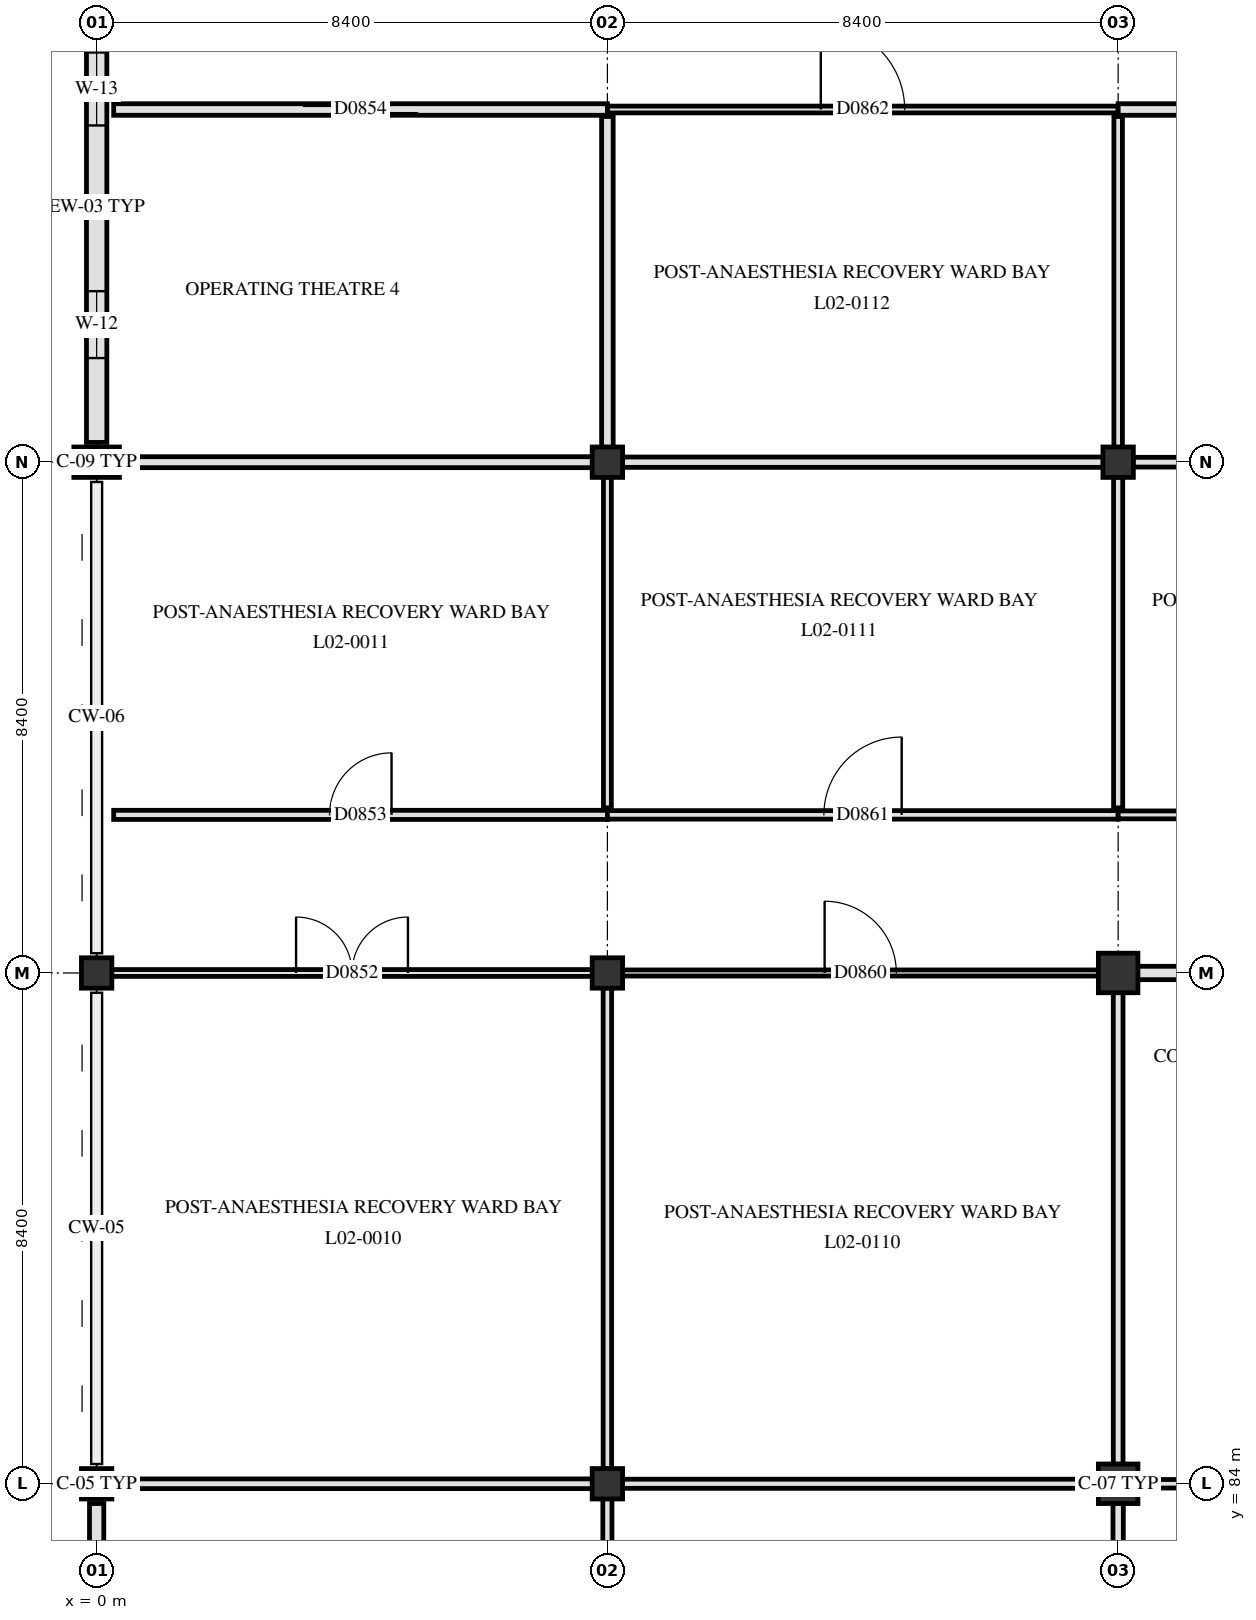
"""IFC4 building model, lengths in metres.
Left out: names, types, materials, properties, quantities, classifications, styles, units other than length and angle.
Written with IfcOpenShell. Run it as: python <this file> out.ifc"""

import sys

from ifc_helpers import new_model, si_unit, direction, frame, frame_2d, origin, origin_2d, place, context, subcontext, project, spatial, rectangle, circle, extrude, element, fill, save


model = new_model("IFC4")
c1 = context("Model", 3, precision=1e-05, world=origin(), true_north=direction((0.0, 1.0)))
c2 = subcontext(c1, "Body", "Model", "MODEL_VIEW")
j1 = project(units=[si_unit("LENGTHUNIT", "METRE"), si_unit("PLANEANGLEUNIT", "RADIAN")], contexts=[c1])
p1 = place(None, origin())
s1 = spatial("IfcSite", under=j1, at=p1, CompositionType="ELEMENT")
p2 = place(p1, origin())
s2 = spatial("IfcBuilding", under=s1, at=p2, CompositionType="ELEMENT")
p3 = place(p2, frame((0.0, 0.0, 9.3)))
s3 = spatial("IfcBuildingStorey", under=s2, at=p3, CompositionType="ELEMENT", Elevation=9.3)
for number, where, z_axis, x_axis in (
    (1, (0.0, 84.0, 0.0), (0.0, 0.0, 1.0), (1.0, 0.0, 0.0)),
    (2, (0.0, 92.4, 0.0), (0.0, 0.0, 1.0), (1.0, 0.0, 0.0)),
):
    element("IfcColumn", number, at=place(p3, frame(where, z_axis=z_axis, x_axis=x_axis)), inside=s3, PredefinedType="COLUMN", context=c2, shape_type="SweptSolid", body=[
        extrude(rectangle(XDim=0.5, YDim=0.5, at=origin_2d()), origin(), (0.0, 0.0, 1.0), 5.1),
    ])
p4 = place(p3, frame((0.0, 100.8, 0.0), z_axis=(0.0, 0.0, 1.0), x_axis=(0.0, 1.0, 0.0)))
e3 = element("IfcColumn", 3, at=p4, inside=s3, PredefinedType="PILASTER", context=c2, shape_type="SweptSolid", body=[
    extrude(rectangle(XDim=0.5, YDim=0.75, at=origin_2d()), origin(), (0.0, 0.0, 1.0), 5.1),
])
for number, where, z_axis, x_axis in (
    (4, (8.4, 84.0, 0.0), (0.0, 0.0, 1.0), (1.0, 0.0, 0.0)),
    (5, (8.4, 92.4, 0.0), (0.0, 0.0, 1.0), (1.0, 0.0, 0.0)),
    (6, (8.4, 100.8, 0.0), (0.0, 0.0, 1.0), (1.0, 0.0, 0.0)),
):
    element("IfcColumn", number, at=place(p3, frame(where, z_axis=z_axis, x_axis=x_axis)), inside=s3, PredefinedType="COLUMN", context=c2, shape_type="SweptSolid", body=[
        extrude(rectangle(XDim=0.5, YDim=0.5, at=origin_2d()), origin(), (0.0, 0.0, 1.0), 5.1),
    ])
for number, where, z_axis, x_axis in (
    (7, (16.8, 84.0, 0.0), (0.0, 0.0, 1.0), (1.0, 0.0, 0.0)),
    (8, (16.8, 92.4, 0.0), (0.0, 0.0, 1.0), (1.0, 0.0, 0.0)),
):
    element("IfcColumn", number, at=place(p3, frame(where, z_axis=z_axis, x_axis=x_axis)), inside=s3, PredefinedType="COLUMN", context=c2, shape_type="SweptSolid", body=[
        extrude(circle(Radius=0.325, at=origin_2d()), origin(), (0.0, 0.0, 1.0), 5.1),
    ])
p5 = place(p3, frame((16.8, 100.8, 0.0), z_axis=(0.0, 0.0, 1.0), x_axis=(1.0, 0.0, 0.0)))
e9 = element("IfcColumn", 9, at=p5, inside=s3, PredefinedType="COLUMN", context=c2, shape_type="SweptSolid", body=[
    extrude(rectangle(XDim=0.5, YDim=0.5, at=origin_2d()), origin(), (0.0, 0.0, 1.0), 5.1),
])
p6 = place(p3, frame((0.0, 75.925, 0.0), z_axis=(0.0, 0.0, 1.0), x_axis=(0.0, 1.0, 0.0)))
e10 = element("IfcWall", 10, at=p6, inside=s3, PredefinedType="SOLIDWALL", context=c2, shape_type="SweptSolid", body=[
    extrude(rectangle(XDim=7.75, YDim=0.235, at=frame_2d((3.875, 0.0))), origin(), (0.0, 0.0, 1.0), 4.07),
])
p7 = place(p6, frame((1.012, 0.0, 0.85)))
e11 = element("IfcOpeningElement", 11, at=p7, cuts=e10, PredefinedType="OPENING", context=c2, shape_type="SweptSolid", body=[
    extrude(rectangle(XDim=1.85, YDim=1.3, at=frame_2d((0.925, 0.65))), frame((0.0, 0.127, 0.0), z_axis=(0.0, -1.0, 0.0), x_axis=(1.0, 0.0, 0.0)), (0.0, 0.0, 1.0), 0.255),
])
p8 = place(p6, frame((5.312, 0.0, 0.85)))
e12 = element("IfcOpeningElement", 12, at=p8, cuts=e10, PredefinedType="OPENING", context=c2, shape_type="SweptSolid", body=[
    extrude(rectangle(XDim=1.0, YDim=1.42, at=frame_2d((0.5, 0.71))), frame((0.0, 0.127, 0.0), z_axis=(0.0, -1.0, 0.0), x_axis=(1.0, 0.0, 0.0)), (0.0, 0.0, 1.0), 0.255),
])
p9 = place(p3, frame((0.0, 101.125, 0.0), z_axis=(0.0, 0.0, 1.0), x_axis=(0.0, 1.0, 0.0)))
e13 = element("IfcWall", 13, at=p9, inside=s3, PredefinedType="SOLIDWALL", context=c2, shape_type="SweptSolid", body=[
    extrude(rectangle(XDim=7.75, YDim=0.335, at=frame_2d((3.875, 0.0))), origin(), (0.0, 0.0, 1.0), 4.07),
])
p10 = place(p9, frame((1.387, 0.0, 0.85)))
e14 = element("IfcOpeningElement", 14, at=p10, cuts=e13, PredefinedType="OPENING", context=c2, shape_type="SweptSolid", body=[
    extrude(rectangle(XDim=1.1, YDim=1.42, at=frame_2d((0.55, 0.71))), frame((0.0, 0.177, 0.0), z_axis=(0.0, -1.0, 0.0), x_axis=(1.0, 0.0, 0.0)), (0.0, 0.0, 1.0), 0.355),
])
p11 = place(p9, frame((5.212, 0.0, 0.85)))
e15 = element("IfcOpeningElement", 15, at=p11, cuts=e13, PredefinedType="OPENING", context=c2, shape_type="SweptSolid", body=[
    extrude(rectangle(XDim=1.2, YDim=1.42, at=frame_2d((0.6, 0.71))), frame((0.0, 0.177, 0.0), z_axis=(0.0, -1.0, 0.0), x_axis=(1.0, 0.0, 0.0)), (0.0, 0.0, 1.0), 0.355),
])
p12 = place(p3, frame((0.245, 84.0, 0.0), z_axis=(0.0, 0.0, 1.0), x_axis=(1.0, 0.0, 0.0)))
e16 = element("IfcWall", 16, at=p12, inside=s3, PredefinedType="PARTITIONING", context=c2, shape_type="SweptSolid", body=[
    extrude(rectangle(XDim=7.91, YDim=0.16, at=frame_2d((3.955, 0.0))), origin(), (0.0, 0.0, 1.0), 4.02),
])
p13 = place(p3, frame((8.645, 84.0, 0.0), z_axis=(0.0, 0.0, 1.0), x_axis=(1.0, 0.0, 0.0)))
e17 = element("IfcWall", 17, at=p13, inside=s3, PredefinedType="PARTITIONING", context=c2, shape_type="SweptSolid", body=[
    extrude(rectangle(XDim=7.835, YDim=0.15, at=frame_2d((3.917, 0.0))), origin(), (0.0, 0.0, 1.0), 4.02),
])
p14 = place(p3, frame((17.12, 84.0, 0.0), z_axis=(0.0, 0.0, 1.0), x_axis=(1.0, 0.0, 0.0)))
e18 = element("IfcWall", 18, at=p14, inside=s3, PredefinedType="PARTITIONING", context=c2, shape_type="SweptSolid", body=[
    extrude(rectangle(XDim=1.38, YDim=0.14, at=frame_2d((0.69, 0.0))), origin(), (0.0, 0.0, 1.0), 4.77),
])
p15 = place(p3, frame((0.245, 92.4, 0.0), z_axis=(0.0, 0.0, 1.0), x_axis=(1.0, 0.0, 0.0)))
e19 = element("IfcWall", 19, at=p15, inside=s3, PredefinedType="PARTITIONING", context=c2, shape_type="SweptSolid", body=[
    extrude(rectangle(XDim=7.91, YDim=0.112, at=frame_2d((3.955, 0.0))), origin(), (0.0, 0.0, 1.0), 4.02),
])
p16 = place(p15, frame((3.035, 0.0, 0.0)))
e20 = element("IfcOpeningElement", 20, at=p16, cuts=e19, PredefinedType="OPENING", context=c2, shape_type="SweptSolid", body=[
    extrude(rectangle(XDim=1.84, YDim=2.28, at=frame_2d((0.92, 1.14))), frame((0.0, 0.066, 0.0), z_axis=(0.0, -1.0, 0.0), x_axis=(1.0, 0.0, 0.0)), (0.0, 0.0, 1.0), 0.132),
])
p17 = place(p3, frame((8.645, 92.4, 0.0), z_axis=(0.0, 0.0, 1.0), x_axis=(1.0, 0.0, 0.0)))
e21 = element("IfcWall", 21, at=p17, inside=s3, PredefinedType="PARTITIONING", context=c2, shape_type="SweptSolid", body=[
    extrude(rectangle(XDim=7.835, YDim=0.1, at=frame_2d((3.917, 0.0))), origin(), (0.0, 0.0, 1.0), 4.02),
])
p18 = place(p17, frame((3.327, 0.0, 0.0)))
e22 = element("IfcOpeningElement", 22, at=p18, cuts=e21, PredefinedType="OPENING", context=c2, shape_type="SweptSolid", body=[
    extrude(rectangle(XDim=1.18, YDim=2.18, at=frame_2d((0.59, 1.09))), frame((0.0, 0.06, 0.0), z_axis=(0.0, -1.0, 0.0), x_axis=(1.0, 0.0, 0.0)), (0.0, 0.0, 1.0), 0.12),
])
p19 = place(p3, frame((17.12, 92.4, 0.0), z_axis=(0.0, 0.0, 1.0), x_axis=(1.0, 0.0, 0.0)))
e23 = element("IfcWall", 23, at=p19, inside=s3, PredefinedType="PARTITIONING", context=c2, shape_type="SweptSolid", body=[
    extrude(rectangle(XDim=7.76, YDim=0.22, at=frame_2d((3.88, 0.0))), origin(), (0.0, 0.0, 1.0), 4.02),
])
p20 = place(p19, frame((3.155, 0.0, 0.0)))
e24 = element("IfcOpeningElement", 24, at=p20, cuts=e23, PredefinedType="OPENING", context=c2, shape_type="SweptSolid", body=[
    extrude(rectangle(XDim=1.45, YDim=2.2, at=frame_2d((0.725, 1.1))), frame((0.0, 0.12, 0.0), z_axis=(0.0, -1.0, 0.0), x_axis=(1.0, 0.0, 0.0)), (0.0, 0.0, 1.0), 0.24),
])
p21 = place(p3, frame((0.28, 95.0, 0.0), z_axis=(0.0, 0.0, 1.0), x_axis=(1.0, 0.0, 0.0)))
e25 = element("IfcWall", 25, at=p21, inside=s3, PredefinedType="PARTITIONING", context=c2, shape_type="SweptSolid", body=[
    extrude(rectangle(XDim=8.12, YDim=0.15, at=frame_2d((4.06, 0.0))), origin(), (0.0, 0.0, 1.0), 4.17),
])
p22 = place(p21, frame((3.55, 0.0, 0.0)))
e26 = element("IfcOpeningElement", 26, at=p22, cuts=e25, PredefinedType="OPENING", context=c2, shape_type="SweptSolid", body=[
    extrude(rectangle(XDim=1.02, YDim=2.12, at=frame_2d((0.51, 1.06))), frame((0.0, 0.085, 0.0), z_axis=(0.0, -1.0, 0.0), x_axis=(1.0, 0.0, 0.0)), (0.0, 0.0, 1.0), 0.17),
])
p23 = place(p3, frame((8.4, 95.0, 0.0), z_axis=(0.0, 0.0, 1.0), x_axis=(1.0, 0.0, 0.0)))
e27 = element("IfcWall", 27, at=p23, inside=s3, PredefinedType="PARTITIONING", context=c2, shape_type="SweptSolid", body=[
    extrude(rectangle(XDim=8.4, YDim=0.14, at=frame_2d((4.2, 0.0))), origin(), (0.0, 0.0, 1.0), 4.17),
])
p24 = place(p23, frame((3.56, 0.0, 0.0)))
e28 = element("IfcOpeningElement", 28, at=p24, cuts=e27, PredefinedType="OPENING", context=c2, shape_type="SweptSolid", body=[
    extrude(rectangle(XDim=1.28, YDim=2.18, at=frame_2d((0.64, 1.09))), frame((0.0, 0.08, 0.0), z_axis=(0.0, -1.0, 0.0), x_axis=(1.0, 0.0, 0.0)), (0.0, 0.0, 1.0), 0.16),
])
p25 = place(p3, frame((16.8, 95.0, 0.0), z_axis=(0.0, 0.0, 1.0), x_axis=(1.0, 0.0, 0.0)))
e29 = element("IfcWall", 29, at=p25, inside=s3, PredefinedType="PARTITIONING", context=c2, shape_type="SweptSolid", body=[
    extrude(rectangle(XDim=8.4, YDim=0.13, at=frame_2d((4.2, 0.0))), origin(), (0.0, 0.0, 1.0), 4.17),
])
p26 = place(p25, frame((3.4, 0.0, 0.0)))
e30 = element("IfcOpeningElement", 30, at=p26, cuts=e29, PredefinedType="OPENING", context=c2, shape_type="SweptSolid", body=[
    extrude(rectangle(XDim=1.6, YDim=2.25, at=frame_2d((0.8, 1.125))), frame((0.0, 0.075, 0.0), z_axis=(0.0, -1.0, 0.0), x_axis=(1.0, 0.0, 0.0)), (0.0, 0.0, 1.0), 0.15),
])
p27 = place(p3, frame((0.245, 100.8, 0.0), z_axis=(0.0, 0.0, 1.0), x_axis=(1.0, 0.0, 0.0)))
e31 = element("IfcWall", 31, at=p27, inside=s3, PredefinedType="PARTITIONING", context=c2, shape_type="SweptSolid", body=[
    extrude(rectangle(XDim=7.91, YDim=0.18, at=frame_2d((3.955, 0.0))), origin(), (0.0, 0.0, 1.0), 4.02),
])
p28 = place(p3, frame((8.645, 100.8, 0.0), z_axis=(0.0, 0.0, 1.0), x_axis=(1.0, 0.0, 0.0)))
e32 = element("IfcWall", 32, at=p28, inside=s3, PredefinedType="PARTITIONING", context=c2, shape_type="SweptSolid", body=[
    extrude(rectangle(XDim=7.91, YDim=0.17, at=frame_2d((3.955, 0.0))), origin(), (0.0, 0.0, 1.0), 4.02),
])
p29 = place(p3, frame((17.045, 100.8, 0.0), z_axis=(0.0, 0.0, 1.0), x_axis=(1.0, 0.0, 0.0)))
e33 = element("IfcWall", 33, at=p29, inside=s3, PredefinedType="PARTITIONING", context=c2, shape_type="SweptSolid", body=[
    extrude(rectangle(XDim=7.91, YDim=0.16, at=frame_2d((3.955, 0.0))), origin(), (0.0, 0.0, 1.0), 4.02),
])
p30 = place(p3, frame((0.28, 106.6, 0.0), z_axis=(0.0, 0.0, 1.0), x_axis=(1.0, 0.0, 0.0)))
e34 = element("IfcWall", 34, at=p30, inside=s3, PredefinedType="PARTITIONING", context=c2, shape_type="SweptSolid", body=[
    extrude(rectangle(XDim=8.12, YDim=0.19, at=frame_2d((4.06, 0.0))), origin(), (0.0, 0.0, 1.0), 4.17),
])
p31 = place(p30, frame((3.11, 0.0, 0.0)))
e35 = element("IfcOpeningElement", 35, at=p31, cuts=e34, PredefinedType="OPENING", context=c2, shape_type="SweptSolid", body=[
    extrude(rectangle(XDim=1.9, YDim=2.3, at=frame_2d((0.95, 1.15))), frame((0.0, 0.105, 0.0), z_axis=(0.0, -1.0, 0.0), x_axis=(1.0, 0.0, 0.0)), (0.0, 0.0, 1.0), 0.21),
])
p32 = place(p3, frame((8.4, 106.6, 0.0), z_axis=(0.0, 0.0, 1.0), x_axis=(1.0, 0.0, 0.0)))
e36 = element("IfcWall", 36, at=p32, inside=s3, PredefinedType="PARTITIONING", context=c2, shape_type="SweptSolid", body=[
    extrude(rectangle(XDim=8.4, YDim=0.112, at=frame_2d((4.2, 0.0))), origin(), (0.0, 0.0, 1.0), 4.17),
])
p33 = place(p32, frame((3.51, 0.0, 0.0)))
e37 = element("IfcOpeningElement", 37, at=p33, cuts=e36, PredefinedType="OPENING", context=c2, shape_type="SweptSolid", body=[
    extrude(rectangle(XDim=1.38, YDim=2.22, at=frame_2d((0.69, 1.11))), frame((0.0, 0.066, 0.0), z_axis=(0.0, -1.0, 0.0), x_axis=(1.0, 0.0, 0.0)), (0.0, 0.0, 1.0), 0.132),
])
p34 = place(p3, frame((16.8, 106.6, 0.0), z_axis=(0.0, 0.0, 1.0), x_axis=(1.0, 0.0, 0.0)))
e38 = element("IfcWall", 38, at=p34, inside=s3, PredefinedType="PARTITIONING", context=c2, shape_type="SweptSolid", body=[
    extrude(rectangle(XDim=8.4, YDim=0.19, at=frame_2d((4.2, 0.0))), origin(), (0.0, 0.0, 1.0), 4.17),
])
p35 = place(p34, frame((3.25, 0.0, 0.0)))
e39 = element("IfcOpeningElement", 39, at=p35, cuts=e38, PredefinedType="OPENING", context=c2, shape_type="SweptSolid", body=[
    extrude(rectangle(XDim=1.9, YDim=2.3, at=frame_2d((0.95, 1.15))), frame((0.0, 0.105, 0.0), z_axis=(0.0, -1.0, 0.0), x_axis=(1.0, 0.0, 0.0)), (0.0, 0.0, 1.0), 0.21),
])
p36 = place(p3, frame((8.4, 78.315, 0.0), z_axis=(0.0, 0.0, 1.0), x_axis=(0.0, 1.0, 0.0)))
e40 = element("IfcWall", 40, at=p36, inside=s3, PredefinedType="PARTITIONING", context=c2, shape_type="SweptSolid", body=[
    extrude(rectangle(XDim=5.44, YDim=0.15, at=frame_2d((2.72, 0.0))), origin(), (0.0, 0.0, 1.0), 4.17),
])
p37 = place(p3, frame((8.4, 84.245, 0.0), z_axis=(0.0, 0.0, 1.0), x_axis=(0.0, 1.0, 0.0)))
e41 = element("IfcWall", 41, at=p37, inside=s3, PredefinedType="PARTITIONING", context=c2, shape_type="SweptSolid", body=[
    extrude(rectangle(XDim=7.91, YDim=0.14, at=frame_2d((3.955, 0.0))), origin(), (0.0, 0.0, 1.0), 4.17),
])
p38 = place(p3, frame((8.4, 95.115, 0.0), z_axis=(0.0, 0.0, 1.0), x_axis=(0.0, 1.0, 0.0)))
e42 = element("IfcWall", 42, at=p38, inside=s3, PredefinedType="PARTITIONING", context=c2, shape_type="SweptSolid", body=[
    extrude(rectangle(XDim=5.44, YDim=0.13, at=frame_2d((2.72, 0.0))), origin(), (0.0, 0.0, 1.0), 4.17),
])
p39 = place(p3, frame((8.4, 101.045, 0.0), z_axis=(0.0, 0.0, 1.0), x_axis=(0.0, 1.0, 0.0)))
e43 = element("IfcWall", 43, at=p39, inside=s3, PredefinedType="PARTITIONING", context=c2, shape_type="SweptSolid", body=[
    extrude(rectangle(XDim=5.44, YDim=0.19, at=frame_2d((2.72, 0.0))), origin(), (0.0, 0.0, 1.0), 4.17),
])
p40 = place(p3, frame((16.8, 78.315, 0.0), z_axis=(0.0, 0.0, 1.0), x_axis=(0.0, 1.0, 0.0)))
e44 = element("IfcWall", 44, at=p40, inside=s3, PredefinedType="PARTITIONING", context=c2, shape_type="SweptSolid", body=[
    extrude(rectangle(XDim=5.365, YDim=0.17, at=frame_2d((2.683, 0.0))), origin(), (0.0, 0.0, 1.0), 4.17),
])
p41 = place(p3, frame((16.8, 84.32, 0.0), z_axis=(0.0, 0.0, 1.0), x_axis=(0.0, 1.0, 0.0)))
e45 = element("IfcWall", 45, at=p41, inside=s3, PredefinedType="PARTITIONING", context=c2, shape_type="SweptSolid", body=[
    extrude(rectangle(XDim=7.76, YDim=0.16, at=frame_2d((3.88, 0.0))), origin(), (0.0, 0.0, 1.0), 4.17),
])
p42 = place(p3, frame((16.8, 95.115, 0.0), z_axis=(0.0, 0.0, 1.0), x_axis=(0.0, 1.0, 0.0)))
e46 = element("IfcWall", 46, at=p42, inside=s3, PredefinedType="PARTITIONING", context=c2, shape_type="SweptSolid", body=[
    extrude(rectangle(XDim=5.44, YDim=0.15, at=frame_2d((2.72, 0.0))), origin(), (0.0, 0.0, 1.0), 4.17),
])
p43 = place(p3, frame((16.8, 101.045, 0.0), z_axis=(0.0, 0.0, 1.0), x_axis=(0.0, 1.0, 0.0)))
e47 = element("IfcWall", 47, at=p43, inside=s3, PredefinedType="PARTITIONING", context=c2, shape_type="SweptSolid", body=[
    extrude(rectangle(XDim=5.44, YDim=0.14, at=frame_2d((2.72, 0.0))), origin(), (0.0, 0.0, 1.0), 4.17),
])
p44 = place(p10, origin())
e48 = element("IfcWindow", 48, at=p44, inside=s3, PartitioningType="SINGLE_PANEL", PredefinedType="WINDOW", context=c2, shape_type="SweptSolid", body=[
    extrude(rectangle(XDim=1.1, YDim=1.42, at=frame_2d((0.55, 0.71))), frame((0.0, 0.03, 0.0), z_axis=(0.0, -1.0, 0.0), x_axis=(1.0, 0.0, 0.0)), (0.0, 0.0, 1.0), 0.06),
])
fill(e14, e48)
p45 = place(p11, origin())
e49 = element("IfcWindow", 49, at=p45, inside=s3, PartitioningType="SINGLE_PANEL", PredefinedType="WINDOW", context=c2, shape_type="SweptSolid", body=[
    extrude(rectangle(XDim=1.2, YDim=1.42, at=frame_2d((0.6, 0.71))), frame((0.0, 0.03, 0.0), z_axis=(0.0, -1.0, 0.0), x_axis=(1.0, 0.0, 0.0)), (0.0, 0.0, 1.0), 0.06),
])
fill(e15, e49)
p46 = place(p16, origin())
e50 = element("IfcDoor", 50, at=p46, inside=s3, OperationType="DOUBLE_SWING_LEFT", PredefinedType="DOOR", context=c2, shape_type="SweptSolid", body=[
    extrude(rectangle(XDim=1.84, YDim=2.28, at=frame_2d((0.92, 1.14))), frame((0.0, 0.025, 0.0), z_axis=(0.0, -1.0, 0.0), x_axis=(1.0, 0.0, 0.0)), (0.0, 0.0, 1.0), 0.05),
])
fill(e20, e50)
p47 = place(p22, origin())
e51 = element("IfcDoor", 51, at=p47, inside=s3, OperationType="SINGLE_SWING_RIGHT", PredefinedType="DOOR", context=c2, shape_type="SweptSolid", body=[
    extrude(rectangle(XDim=1.02, YDim=2.12, at=frame_2d((0.51, 1.06))), frame((0.0, 0.025, 0.0), z_axis=(0.0, -1.0, 0.0), x_axis=(1.0, 0.0, 0.0)), (0.0, 0.0, 1.0), 0.05),
])
fill(e26, e51)
p48 = place(p31, origin())
e52 = element("IfcDoor", 52, at=p48, inside=s3, OperationType="SLIDING_TO_LEFT", PredefinedType="DOOR", context=c2, shape_type="SweptSolid", body=[
    extrude(rectangle(XDim=1.9, YDim=2.3, at=frame_2d((0.95, 1.15))), frame((0.0, 0.025, 0.0), z_axis=(0.0, -1.0, 0.0), x_axis=(1.0, 0.0, 0.0)), (0.0, 0.0, 1.0), 0.05),
])
fill(e35, e52)
p49 = place(p18, origin())
e53 = element("IfcDoor", 53, at=p49, inside=s3, OperationType="SINGLE_SWING_LEFT", PredefinedType="DOOR", context=c2, shape_type="SweptSolid", body=[
    extrude(rectangle(XDim=1.18, YDim=2.18, at=frame_2d((0.59, 1.09))), frame((0.0, 0.025, 0.0), z_axis=(0.0, -1.0, 0.0), x_axis=(1.0, 0.0, 0.0)), (0.0, 0.0, 1.0), 0.05),
])
fill(e22, e53)
p50 = place(p24, origin())
e54 = element("IfcDoor", 54, at=p50, inside=s3, OperationType="SINGLE_SWING_RIGHT", PredefinedType="DOOR", context=c2, shape_type="SweptSolid", body=[
    extrude(rectangle(XDim=1.28, YDim=2.18, at=frame_2d((0.64, 1.09))), frame((0.0, 0.025, 0.0), z_axis=(0.0, -1.0, 0.0), x_axis=(1.0, 0.0, 0.0)), (0.0, 0.0, 1.0), 0.05),
])
fill(e28, e54)
p51 = place(p33, origin())
e55 = element("IfcDoor", 55, at=p51, inside=s3, OperationType="SINGLE_SWING_LEFT", PredefinedType="DOOR", context=c2, shape_type="SweptSolid", body=[
    extrude(rectangle(XDim=1.38, YDim=2.22, at=frame_2d((0.69, 1.11))), frame((0.0, 0.025, 0.0), z_axis=(0.0, -1.0, 0.0), x_axis=(1.0, 0.0, 0.0)), (0.0, 0.0, 1.0), 0.05),
])
fill(e37, e55)
save(model, sys.argv[1])
